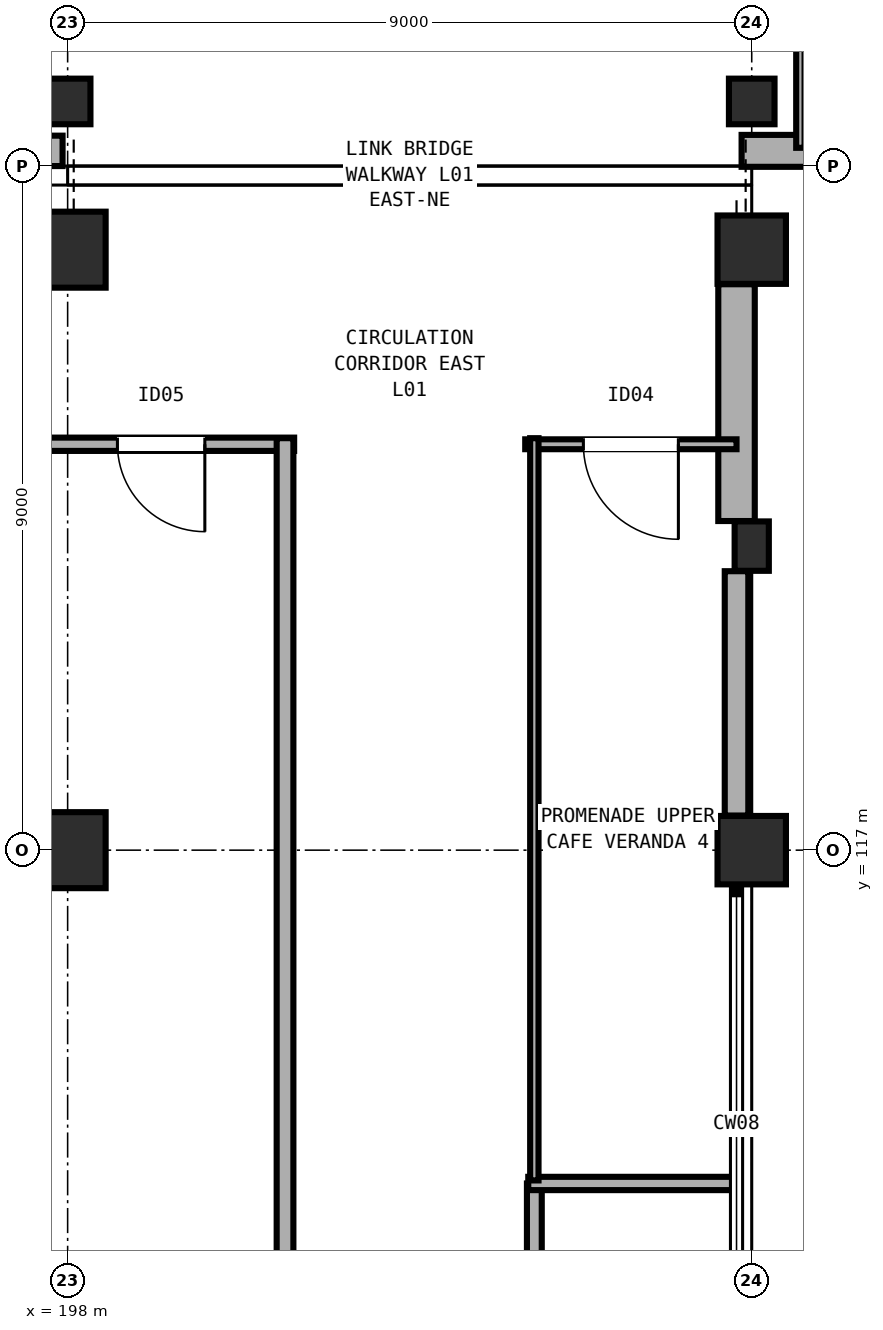
"""IFC4 building model, lengths in metres.
Left out: names, types, materials, properties, quantities, classifications, styles, units other than length and angle.
Written with IfcOpenShell. Run it as: python <this file> out.ifc"""

import sys

from ifc_helpers import new_model, si_unit, direction, frame, frame_2d, origin, origin_2d, place, context, subcontext, project, spatial, rectangle, extrude, element, fill, save


model = new_model("IFC4")
c1 = context("Model", 3, precision=1e-05, world=origin(), true_north=direction((0.0, 1.0)))
c2 = subcontext(c1, "Body", "Model", "MODEL_VIEW")
j1 = project(units=[si_unit("LENGTHUNIT", "METRE"), si_unit("PLANEANGLEUNIT", "RADIAN")], contexts=[c1])
p1 = place(None, origin())
s1 = spatial("IfcSite", under=j1, at=p1, CompositionType="ELEMENT")
p2 = place(p1, origin())
s2 = spatial("IfcBuilding", under=s1, at=p2, CompositionType="ELEMENT")
p3 = place(p2, frame((0.0, 0.0, 4.8)))
s3 = spatial("IfcBuildingStorey", under=s2, at=p3, CompositionType="ELEMENT", Elevation=4.8)
for number, where, z_axis, x_axis in (
    (1, (198.0, 117.0, 0.0), (0.0, 0.0, 1.0), (1.0, 0.0, 0.0)),
    (2, (198.0, 124.9, 0.0), (0.0, 0.0, 1.0), (1.0, 0.0, 0.0)),
):
    element("IfcColumn", number, at=place(p3, frame(where, z_axis=z_axis, x_axis=x_axis)), inside=s3, PredefinedType="COLUMN", context=c2, shape_type="SweptSolid", body=[
        extrude(rectangle(XDim=1.0, YDim=1.0, at=origin_2d()), origin(), (0.0, 0.0, 1.0), 4.8),
    ])
for number, where, z_axis, x_axis in (
    (3, (207.0, 117.0, 0.0), (0.0, 0.0, 1.0), (1.0, 0.0, 0.0)),
    (4, (207.0, 124.9, 0.0), (0.0, 0.0, 1.0), (1.0, 0.0, 0.0)),
):
    element("IfcColumn", number, at=place(p3, frame(where, z_axis=z_axis, x_axis=x_axis)), inside=s3, PredefinedType="COLUMN", context=c2, shape_type="SweptSolid", body=[
        extrude(rectangle(XDim=0.9, YDim=0.9, at=origin_2d()), origin(), (0.0, 0.0, 1.0), 4.8),
    ])
for number, where, z_axis, x_axis in (
    (5, (198.0, 126.85, 0.0), (0.0, 0.0, 1.0), (1.0, 0.0, 0.0)),
    (6, (207.0, 126.85, 0.0), (0.0, 0.0, 1.0), (1.0, 0.0, 0.0)),
):
    element("IfcColumn", number, at=place(p3, frame(where, z_axis=z_axis, x_axis=x_axis)), inside=s3, PredefinedType="COLUMN", context=c2, shape_type="SweptSolid", body=[
        extrude(rectangle(XDim=0.6, YDim=0.6, at=origin_2d()), origin(), (0.0, 0.0, 1.0), 4.8),
    ])
p4 = place(p3, frame((207.0, 121.0, 0.0), z_axis=(0.0, 0.0, 1.0), x_axis=(1.0, 0.0, 0.0)))
e7 = element("IfcColumn", 7, at=p4, inside=s3, PredefinedType="PILASTER", context=c2, shape_type="SweptSolid", body=[
    extrude(rectangle(XDim=0.45, YDim=0.65, at=origin_2d()), origin(), (0.0, 0.0, 1.0), 4.8),
])
p5 = place(p3, frame((206.8, 124.445, 0.0), z_axis=(0.0, 0.0, 1.0), x_axis=(0.0, -1.0, 0.0)))
e8 = element("IfcWall", 8, at=p5, inside=s3, PredefinedType="SOLIDWALL", context=c2, shape_type="SweptSolid", body=[
    extrude(rectangle(XDim=3.115, YDim=0.48, at=frame_2d((1.558, 0.0))), origin(), (0.0, 0.0, 1.0), 3.28),
])
p6 = place(p3, frame((206.8, 120.67, 0.0), z_axis=(0.0, 0.0, 1.0), x_axis=(0.0, -1.0, 0.0)))
e9 = element("IfcWall", 9, at=p6, inside=s3, PredefinedType="SOLIDWALL", context=c2, shape_type="SweptSolid", body=[
    extrude(rectangle(XDim=3.215, YDim=0.31, at=frame_2d((1.607, 0.0))), origin(), (0.0, 0.0, 1.0), 3.28),
])
p7 = place(p3, frame((215.8, 126.2, 0.0), z_axis=(0.0, 0.0, 1.0), x_axis=(-1.0, 0.0, 0.0)))
e10 = element("IfcWall", 10, at=p7, inside=s3, PredefinedType="SOLIDWALL", context=c2, shape_type="SweptSolid", body=[
    extrude(rectangle(XDim=8.933, YDim=0.42, at=frame_2d((4.467, 0.0))), origin(), (0.0, 0.0, 1.0), 3.28),
])
p8 = place(p3, frame((197.933, 126.2, 0.0), z_axis=(0.0, 0.0, 1.0), x_axis=(-1.0, 0.0, 0.0)))
e11 = element("IfcWall", 11, at=p8, inside=s3, PredefinedType="SOLIDWALL", context=c2, shape_type="SweptSolid", body=[
    extrude(rectangle(XDim=8.933, YDim=0.4, at=frame_2d((4.467, 0.0))), origin(), (0.0, 0.0, 1.0), 3.28),
])
p9 = place(p3, frame((200.98, 122.34, 0.0), z_axis=(0.0, 0.0, 1.0), x_axis=(-1.0, 0.0, 0.0)))
e12 = element("IfcWall", 12, at=p9, inside=s3, PredefinedType="PARTITIONING", context=c2, shape_type="SweptSolid", body=[
    extrude(rectangle(XDim=3.5, YDim=0.175, at=frame_2d((1.75, 0.0))), origin(), (0.0, 0.0, 1.0), 3.28),
])
p10 = place(p9, frame((1.175, 0.0, 0.0)))
e13 = element("IfcOpeningElement", 13, at=p10, cuts=e12, PredefinedType="OPENING", context=c2, shape_type="SweptSolid", body=[
    extrude(rectangle(XDim=1.15, YDim=2.15, at=frame_2d((0.575, 1.075))), frame((0.0, 0.097, 0.0), z_axis=(0.0, -1.0, 0.0), x_axis=(1.0, 0.0, 0.0)), (0.0, 0.0, 1.0), 0.195),
])
p11 = place(p3, frame((200.86, 122.42, 0.0), z_axis=(0.0, 0.0, 1.0), x_axis=(0.0, -1.0, 0.0)))
e14 = element("IfcWall", 14, at=p11, inside=s3, PredefinedType="PARTITIONING", context=c2, shape_type="SweptSolid", body=[
    extrude(rectangle(XDim=14.722, YDim=0.22, at=frame_2d((7.361, 0.0))), origin(), (0.0, 0.0, 1.0), 3.28),
])
p12 = place(p3, frame((204.14, 112.615, 0.0), z_axis=(0.0, 0.0, 1.0), x_axis=(0.0, -1.0, 0.0)))
e15 = element("IfcWall", 15, at=p12, inside=s3, PredefinedType="PARTITIONING", context=c2, shape_type="SweptSolid", body=[
    extrude(rectangle(XDim=9.845, YDim=0.195, at=frame_2d((4.922, 0.0))), origin(), (0.0, 0.0, 1.0), 3.28),
])
p13 = place(p12, frame((4.363, 0.0, 0.0)))
e16 = element("IfcOpeningElement", 16, at=p13, cuts=e15, PredefinedType="OPENING", context=c2, shape_type="SweptSolid", body=[
    extrude(rectangle(XDim=1.12, YDim=2.22, at=frame_2d((0.56, 1.11))), frame((0.0, 0.107, 0.0), z_axis=(0.0, -1.0, 0.0), x_axis=(1.0, 0.0, 0.0)), (0.0, 0.0, 1.0), 0.215),
])
p14 = place(p3, frame((204.06, 112.615, 0.0), z_axis=(0.0, 0.0, 1.0), x_axis=(1.0, 0.0, 0.0)))
e17 = element("IfcWall", 17, at=p14, inside=s3, PredefinedType="PARTITIONING", context=c2, shape_type="SweptSolid", body=[
    extrude(rectangle(XDim=2.707, YDim=0.175, at=frame_2d((1.354, 0.0))), origin(), (0.0, 0.0, 1.0), 3.28),
])
p15 = place(p3, frame((206.8, 122.34, 0.0), z_axis=(0.0, 0.0, 1.0), x_axis=(-1.0, 0.0, 0.0)))
e18 = element("IfcWall", 18, at=p15, inside=s3, PredefinedType="PARTITIONING", context=c2, shape_type="SweptSolid", body=[
    extrude(rectangle(XDim=2.78, YDim=0.13, at=frame_2d((1.39, 0.0))), origin(), (0.0, 0.0, 1.0), 3.28),
])
p16 = place(p15, frame((0.765, 0.0, 0.0)))
e19 = element("IfcOpeningElement", 19, at=p16, cuts=e18, PredefinedType="OPENING", context=c2, shape_type="SweptSolid", body=[
    extrude(rectangle(XDim=1.25, YDim=2.15, at=frame_2d((0.625, 1.075))), frame((0.0, 0.075, 0.0), z_axis=(0.0, -1.0, 0.0), x_axis=(1.0, 0.0, 0.0)), (0.0, 0.0, 1.0), 0.15),
])
p17 = place(p3, frame((204.14, 112.655, 0.0), z_axis=(0.0, 0.0, 1.0), x_axis=(0.0, 1.0, 0.0)))
e20 = element("IfcWall", 20, at=p17, inside=s3, PredefinedType="PARTITIONING", context=c2, shape_type="SweptSolid", body=[
    extrude(rectangle(XDim=9.765, YDim=0.11, at=frame_2d((4.882, 0.0))), origin(), (0.0, 0.0, 1.0), 3.28),
])
p18 = place(p3, frame((207.64, 126.24, 0.0), z_axis=(0.0, 0.0, 1.0), x_axis=(0.0, 1.0, 0.0)))
e21 = element("IfcWall", 21, at=p18, inside=s3, PredefinedType="PARTITIONING", context=c2, shape_type="SweptSolid", body=[
    extrude(rectangle(XDim=3.01, YDim=0.11, at=frame_2d((1.505, 0.0))), origin(), (0.0, 0.0, 1.0), 3.28),
])
p19 = place(p10, origin())
e22 = element("IfcDoor", 22, at=p19, inside=s3, OperationType="SINGLE_SWING_LEFT", PredefinedType="DOOR", context=c2, shape_type="SweptSolid", body=[
    extrude(rectangle(XDim=1.15, YDim=2.15, at=frame_2d((0.575, 1.075))), frame((0.0, 0.025, 0.0), z_axis=(0.0, -1.0, 0.0), x_axis=(1.0, 0.0, 0.0)), (0.0, 0.0, 1.0), 0.05),
])
fill(e13, e22)
p20 = place(p16, origin())
e23 = element("IfcDoor", 23, at=p20, inside=s3, OperationType="SINGLE_SWING_LEFT", PredefinedType="DOOR", context=c2, shape_type="SweptSolid", body=[
    extrude(rectangle(XDim=1.25, YDim=2.15, at=frame_2d((0.625, 1.075))), frame((0.0, 0.025, 0.0), z_axis=(0.0, -1.0, 0.0), x_axis=(1.0, 0.0, 0.0)), (0.0, 0.0, 1.0), 0.05),
])
fill(e19, e23)
save(model, sys.argv[1])
